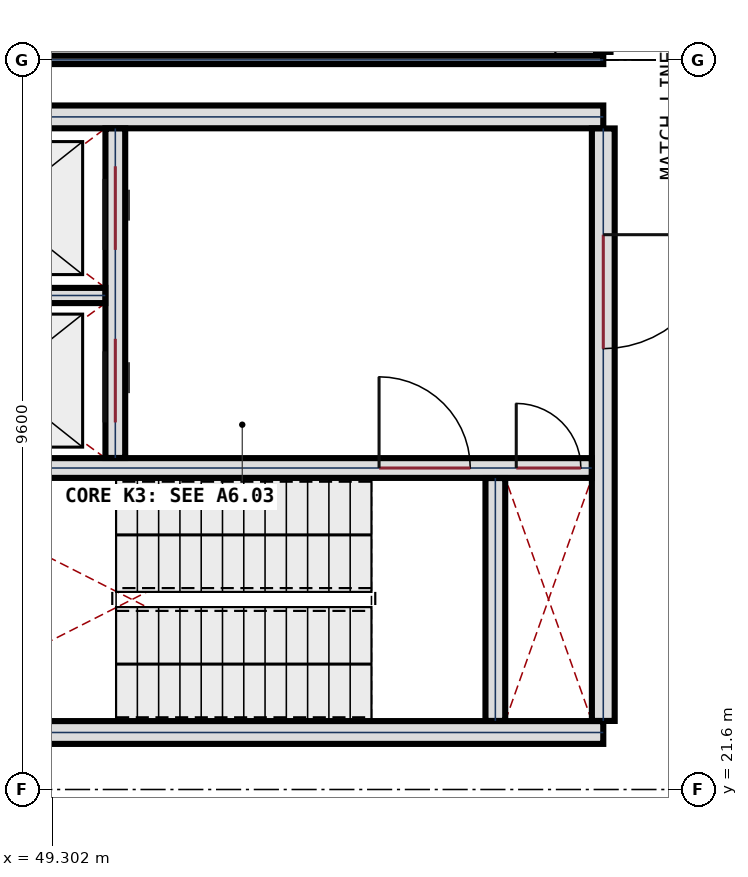
"""IFC4 building model, lengths in metres.
Left out: names, types, materials, properties, quantities, classifications, styles, units other than length and angle.
Written with IfcOpenShell. Run it as: python <this file> out.ifc"""

import sys

from ifc_helpers import new_model, si_unit, direction, frame, frame_2d, origin, place, context, subcontext, project, spatial, rectangle, extrude, element, fill, save


model = new_model("IFC4")
c1 = context("Model", 3, precision=1e-05, world=origin(), true_north=direction((0.0, 1.0)))
c2 = subcontext(c1, "Body", "Model", "MODEL_VIEW")
j1 = project(units=[si_unit("LENGTHUNIT", "METRE"), si_unit("PLANEANGLEUNIT", "RADIAN")], contexts=[c1])
p1 = place(None, origin())
s1 = spatial("IfcSite", under=j1, at=p1, CompositionType="ELEMENT")
p2 = place(p1, origin())
s2 = spatial("IfcBuilding", under=s1, at=p2, CompositionType="ELEMENT")
p3 = place(p2, frame((0.0, 0.0, 14.4)))
s3 = spatial("IfcBuildingStorey", under=s2, at=p3, CompositionType="ELEMENT", Elevation=14.4)
for number, where, z_axis, x_axis in (
    (1, (56.55, 22.35, 0.0), (0.0, 0.0, 1.0), (-1.0, 0.0, 0.0)),
    (2, (47.05, 30.45, 0.0), (0.0, 0.0, 1.0), (1.0, 0.0, 0.0)),
):
    element("IfcWall", number, at=place(p3, frame(where, z_axis=z_axis, x_axis=x_axis)), inside=s3, PredefinedType="SHEAR", context=c2, shape_type="SweptSolid", body=[
        extrude(rectangle(XDim=9.5, YDim=0.3, at=frame_2d((4.75, 0.0))), origin(), (0.0, 0.0, 1.0), 4.5),
    ])
p4 = place(p3, frame((56.55, 30.298, 0.0), z_axis=(0.0, 0.0, 1.0), x_axis=(0.0, -1.0, 0.0)))
e3 = element("IfcWall", 3, at=p4, inside=s3, PredefinedType="SHEAR", context=c2, shape_type="SweptSolid", body=[
    extrude(rectangle(XDim=7.796, YDim=0.3, at=frame_2d((3.898, 0.0))), origin(), (0.0, 0.0, 1.0), 4.5),
])
p5 = place(p4, frame((1.398, 0.0, 0.0)))
e4 = element("IfcOpeningElement", 4, at=p5, cuts=e3, PredefinedType="OPENING", context=c2, shape_type="SweptSolid", body=[
    extrude(rectangle(XDim=1.5, YDim=2.25, at=frame_2d((0.75, 1.125))), frame((0.0, 0.16, 0.0), z_axis=(0.0, -1.0, 0.0), x_axis=(1.0, 0.0, 0.0)), (0.0, 0.0, 1.0), 0.32),
])
p6 = place(p3, frame((47.202, 25.83, 0.0), z_axis=(0.0, 0.0, 1.0), x_axis=(1.0, 0.0, 0.0)))
e5 = element("IfcWall", 5, at=p6, inside=s3, PredefinedType="SHEAR", context=c2, shape_type="SweptSolid", body=[
    extrude(rectangle(XDim=9.196, YDim=0.26, at=frame_2d((4.598, 0.0))), origin(), (0.0, 0.0, 1.0), 4.5),
])
p7 = place(p6, frame((6.398, 0.0, 0.0)))
e6 = element("IfcOpeningElement", 6, at=p7, cuts=e5, PredefinedType="OPENING", context=c2, shape_type="SweptSolid", body=[
    extrude(rectangle(XDim=1.2, YDim=2.2, at=frame_2d((0.6, 1.1))), frame((0.0, 0.14, 0.0), z_axis=(0.0, -1.0, 0.0), x_axis=(1.0, 0.0, 0.0)), (0.0, 0.0, 1.0), 0.28),
])
p8 = place(p6, frame((8.203, 0.0, 0.0)))
e7 = element("IfcOpeningElement", 7, at=p8, cuts=e5, PredefinedType="OPENING", context=c2, shape_type="SweptSolid", body=[
    extrude(rectangle(XDim=0.85, YDim=2.05, at=frame_2d((0.425, 1.025))), frame((0.0, 0.14, 0.0), z_axis=(0.0, -1.0, 0.0), x_axis=(1.0, 0.0, 0.0)), (0.0, 0.0, 1.0), 0.28),
])
p9 = place(p3, frame((55.13, 22.502, 0.0), z_axis=(0.0, 0.0, 1.0), x_axis=(0.0, 1.0, 0.0)))
e8 = element("IfcWall", 8, at=p9, inside=s3, PredefinedType="SHEAR", context=c2, shape_type="SweptSolid", body=[
    extrude(rectangle(XDim=3.196, YDim=0.26, at=frame_2d((1.598, 0.0))), origin(), (0.0, 0.0, 1.0), 4.5),
])
p10 = place(p3, frame((50.13, 25.962, 0.0), z_axis=(0.0, 0.0, 1.0), x_axis=(0.0, 1.0, 0.0)))
e9 = element("IfcWall", 9, at=p10, inside=s3, PredefinedType="SHEAR", context=c2, shape_type="SweptSolid", body=[
    extrude(rectangle(XDim=4.336, YDim=0.26, at=frame_2d((2.168, 0.0))), origin(), (0.0, 0.0, 1.0), 4.5),
])
p11 = place(p10, frame((0.468, 0.0, 0.0)))
e10 = element("IfcOpeningElement", 10, at=p11, cuts=e9, PredefinedType="OPENING", context=c2, shape_type="SweptSolid", body=[
    extrude(rectangle(XDim=1.1, YDim=2.15, at=frame_2d((0.55, 1.075))), frame((0.0, 0.14, 0.0), z_axis=(0.0, -1.0, 0.0), x_axis=(1.0, 0.0, 0.0)), (0.0, 0.0, 1.0), 0.28),
])
p12 = place(p10, frame((2.738, 0.0, 0.0)))
e11 = element("IfcOpeningElement", 11, at=p12, cuts=e9, PredefinedType="OPENING", context=c2, shape_type="SweptSolid", body=[
    extrude(rectangle(XDim=1.1, YDim=2.15, at=frame_2d((0.55, 1.075))), frame((0.0, 0.14, 0.0), z_axis=(0.0, -1.0, 0.0), x_axis=(1.0, 0.0, 0.0)), (0.0, 0.0, 1.0), 0.28),
])
p13 = place(p3, frame((47.202, 28.1, 0.0), z_axis=(0.0, 0.0, 1.0), x_axis=(1.0, 0.0, 0.0)))
e12 = element("IfcWall", 12, at=p13, inside=s3, PredefinedType="PLUMBINGWALL", context=c2, shape_type="SweptSolid", body=[
    extrude(rectangle(XDim=2.796, YDim=0.2, at=frame_2d((1.398, 0.0))), origin(), (0.0, 0.0, 1.0), 4.16),
])
p14 = place(p3, frame((46.653, 31.2, 0.0), z_axis=(0.0, 0.0, 1.0), x_axis=(1.0, 0.0, 0.0)))
e13 = element("IfcWall", 13, at=p14, inside=s3, PredefinedType="PARTITIONING", context=c2, shape_type="SweptSolid", body=[
    extrude(rectangle(XDim=9.897, YDim=0.11, at=frame_2d((4.948, 0.0))), origin(), (0.0, 0.0, 1.0), 3.55),
])
p15 = place(p5, origin())
e14 = element("IfcDoor", 14, at=p15, inside=s3, OperationType="SINGLE_SWING_LEFT", PredefinedType="DOOR", context=c2, shape_type="SweptSolid", body=[
    extrude(rectangle(XDim=1.5, YDim=2.25, at=frame_2d((0.75, 1.125))), frame((0.0, 0.032, 0.0), z_axis=(0.0, -1.0, 0.0), x_axis=(1.0, 0.0, 0.0)), (0.0, 0.0, 1.0), 0.065),
])
fill(e4, e14)
p16 = place(p7, origin())
e15 = element("IfcDoor", 15, at=p16, inside=s3, OperationType="SINGLE_SWING_LEFT", PredefinedType="DOOR", context=c2, shape_type="SweptSolid", body=[
    extrude(rectangle(XDim=1.2, YDim=2.2, at=frame_2d((0.6, 1.1))), frame((0.0, 0.032, 0.0), z_axis=(0.0, -1.0, 0.0), x_axis=(1.0, 0.0, 0.0)), (0.0, 0.0, 1.0), 0.065),
])
fill(e6, e15)
p17 = place(p8, origin())
e16 = element("IfcDoor", 16, at=p17, inside=s3, OperationType="SINGLE_SWING_LEFT", PredefinedType="DOOR", context=c2, shape_type="SweptSolid", body=[
    extrude(rectangle(XDim=0.85, YDim=2.05, at=frame_2d((0.425, 1.025))), frame((0.0, 0.032, 0.0), z_axis=(0.0, -1.0, 0.0), x_axis=(1.0, 0.0, 0.0)), (0.0, 0.0, 1.0), 0.065),
])
fill(e7, e16)
p18 = place(p11, origin())
e17 = element("IfcDoor", 17, at=p18, inside=s3, OperationType="SLIDING_TO_LEFT", PredefinedType="DOOR", context=c2, shape_type="SweptSolid", body=[
    extrude(rectangle(XDim=1.1, YDim=2.15, at=frame_2d((0.55, 1.075))), frame((0.0, 0.032, 0.0), z_axis=(0.0, -1.0, 0.0), x_axis=(1.0, 0.0, 0.0)), (0.0, 0.0, 1.0), 0.065),
])
fill(e10, e17)
p19 = place(p12, origin())
e18 = element("IfcDoor", 18, at=p19, inside=s3, OperationType="SLIDING_TO_LEFT", PredefinedType="DOOR", context=c2, shape_type="SweptSolid", body=[
    extrude(rectangle(XDim=1.1, YDim=2.15, at=frame_2d((0.55, 1.075))), frame((0.0, 0.032, 0.0), z_axis=(0.0, -1.0, 0.0), x_axis=(1.0, 0.0, 0.0)), (0.0, 0.0, 1.0), 0.065),
])
fill(e11, e18)
save(model, sys.argv[1])
